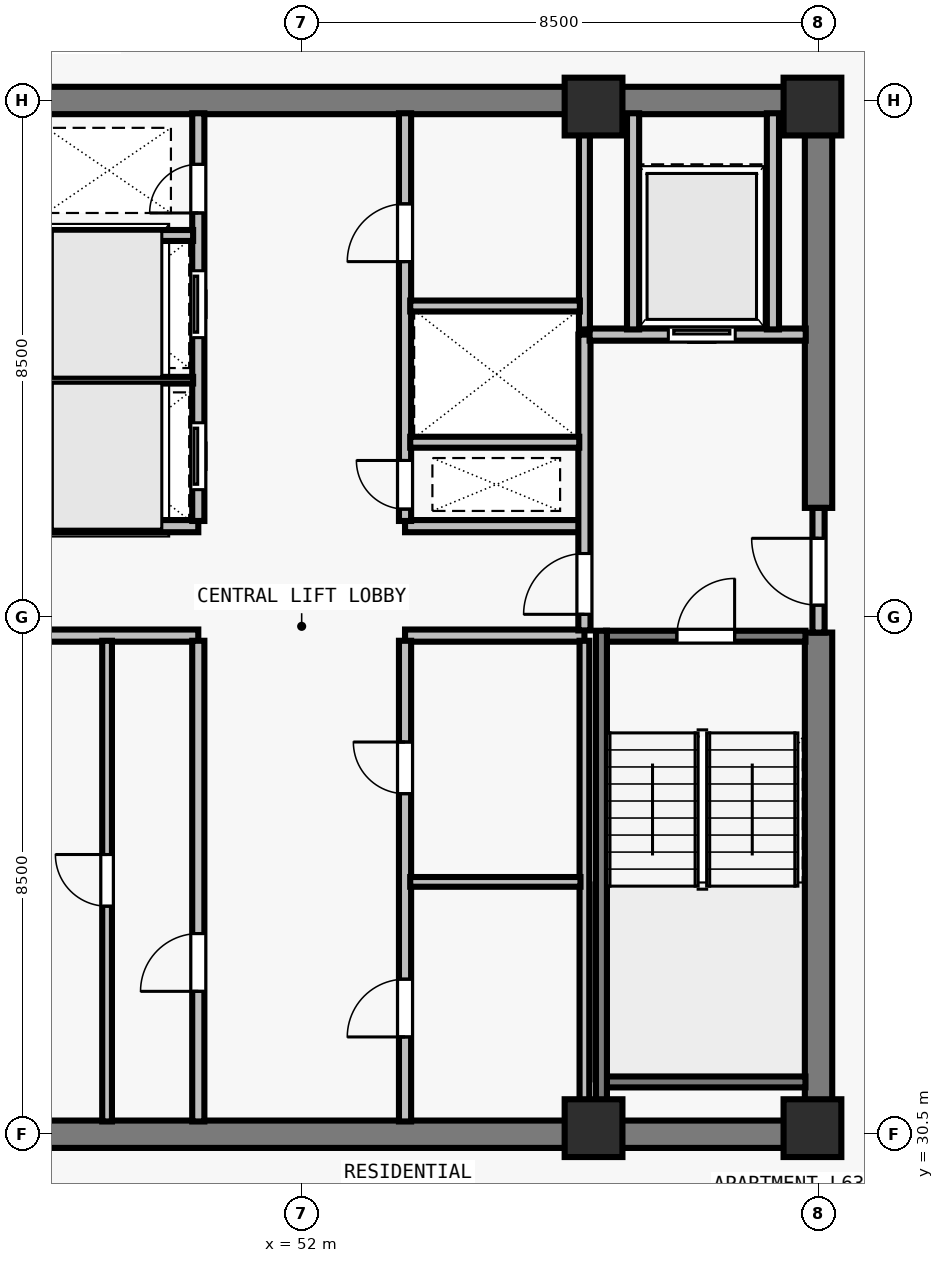
"""IFC4 building model, lengths in metres.
Left out: names, types, materials, properties, quantities, classifications, styles, units other than length and angle.
Written with IfcOpenShell. Run it as: python <this file> out.ifc"""

import sys

from ifc_helpers import new_model, si_unit, direction, frame, frame_2d, origin, origin_2d, place, context, subcontext, project, spatial, rectangle, extrude, element, fill, save


model = new_model("IFC4")
c1 = context("Model", 3, precision=1e-05, world=origin(), true_north=direction((0.0, 1.0)))
c2 = subcontext(c1, "Body", "Model", "MODEL_VIEW")
j1 = project(units=[si_unit("LENGTHUNIT", "METRE"), si_unit("PLANEANGLEUNIT", "RADIAN")], contexts=[c1])
p1 = place(None, origin())
s1 = spatial("IfcSite", under=j1, at=p1, CompositionType="ELEMENT")
p2 = place(p1, origin())
s2 = spatial("IfcBuilding", under=s1, at=p2, CompositionType="ELEMENT")
p3 = place(p2, frame((0.0, 0.0, 230.5)))
s3 = spatial("IfcBuildingStorey", under=s2, at=p3, CompositionType="ELEMENT", Elevation=230.5)
for number, where, z_axis, x_axis in (
    (1, (56.8, 30.6, 0.0), (0.0, 0.0, 1.0), (1.0, 0.0, 0.0)),
    (2, (60.4, 30.6, 0.0), (0.0, 0.0, 1.0), (1.0, 0.0, 0.0)),
    (3, (56.8, 47.4, 0.0), (0.0, 0.0, 1.0), (1.0, 0.0, 0.0)),
    (4, (60.4, 47.4, 0.0), (0.0, 0.0, 1.0), (1.0, 0.0, 0.0)),
):
    element("IfcColumn", number, at=place(p3, frame(where, z_axis=z_axis, x_axis=x_axis)), inside=s3, PredefinedType="COLUMN", context=c2, shape_type="SweptSolid", body=[
        extrude(rectangle(XDim=0.95, YDim=0.95, at=origin_2d()), origin(), (0.0, 0.0, 1.0), 3.5),
    ])
for number, where, z_axis, x_axis in (
    (5, (43.275, 30.5, 0.0), (0.0, 0.0, 1.0), (1.0, 0.0, 0.0)),
    (6, (43.275, 47.5, 0.0), (0.0, 0.0, 1.0), (1.0, 0.0, 0.0)),
):
    element("IfcWall", number, at=place(p3, frame(where, z_axis=z_axis, x_axis=x_axis)), inside=s3, PredefinedType="SHEAR", context=c2, shape_type="SweptSolid", body=[
        extrude(rectangle(XDim=17.45, YDim=0.45, at=frame_2d((8.725, 0.0))), origin(), (0.0, 0.0, 1.0), 3.29),
    ])
p4 = place(p3, frame((60.5, 30.715, 0.0), z_axis=(0.0, 0.0, 1.0), x_axis=(0.0, 1.0, 0.0)))
e7 = element("IfcWall", 7, at=p4, inside=s3, PredefinedType="SHEAR", context=c2, shape_type="SweptSolid", body=[
    extrude(rectangle(XDim=8.035, YDim=0.45, at=frame_2d((4.018, 0.0))), origin(), (0.0, 0.0, 1.0), 3.29),
])
p5 = place(p3, frame((60.5, 40.8, 0.0), z_axis=(0.0, 0.0, 1.0), x_axis=(0.0, 1.0, 0.0)))
e8 = element("IfcWall", 8, at=p5, inside=s3, PredefinedType="SHEAR", context=c2, shape_type="SweptSolid", body=[
    extrude(rectangle(XDim=6.485, YDim=0.45, at=frame_2d((3.242, 0.0))), origin(), (0.0, 0.0, 1.0), 3.29),
])
for number, where, z_axis, x_axis in (
    (9, (47.35, 38.7, 0.0), (0.0, 0.0, 1.0), (1.0, 0.0, 0.0)),
    (10, (47.35, 40.5, 0.0), (0.0, 0.0, 1.0), (1.0, 0.0, 0.0)),
    (11, (53.7, 38.7, 0.0), (0.0, 0.0, 1.0), (1.0, 0.0, 0.0)),
    (12, (53.7, 40.5, 0.0), (0.0, 0.0, 1.0), (1.0, 0.0, 0.0)),
):
    element("IfcWall", number, at=place(p3, frame(where, z_axis=z_axis, x_axis=x_axis)), inside=s3, PredefinedType="SOLIDWALL", context=c2, shape_type="SweptSolid", body=[
        extrude(rectangle(XDim=2.95, YDim=0.2, at=frame_2d((1.475, 0.0))), origin(), (0.0, 0.0, 1.0), 3.29),
    ])
p6 = place(p3, frame((50.3, 30.71, 0.0), z_axis=(0.0, 0.0, 1.0), x_axis=(0.0, 1.0, 0.0)))
e13 = element("IfcWall", 13, at=p6, inside=s3, PredefinedType="SOLIDWALL", context=c2, shape_type="SweptSolid", body=[
    extrude(rectangle(XDim=7.905, YDim=0.2, at=frame_2d((3.953, 0.0))), origin(), (0.0, 0.0, 1.0), 3.29),
])
p7 = place(p6, frame((2.14, 0.0, 0.0)))
e14 = element("IfcOpeningElement", 14, at=p7, cuts=e13, PredefinedType="OPENING", context=c2, shape_type="SweptSolid", body=[
    extrude(rectangle(XDim=0.95, YDim=2.12, at=frame_2d((0.475, 1.06))), frame((0.0, 0.11, 0.0), z_axis=(0.0, -1.0, 0.0), x_axis=(1.0, 0.0, 0.0)), (0.0, 0.0, 1.0), 0.22),
])
p8 = place(p3, frame((53.7, 30.71, 0.0), z_axis=(0.0, 0.0, 1.0), x_axis=(0.0, 1.0, 0.0)))
e15 = element("IfcWall", 15, at=p8, inside=s3, PredefinedType="SOLIDWALL", context=c2, shape_type="SweptSolid", body=[
    extrude(rectangle(XDim=7.905, YDim=0.2, at=frame_2d((3.953, 0.0))), origin(), (0.0, 0.0, 1.0), 3.29),
])
p9 = place(p8, frame((1.39, 0.0, 0.0)))
e16 = element("IfcOpeningElement", 16, at=p9, cuts=e15, PredefinedType="OPENING", context=c2, shape_type="SweptSolid", body=[
    extrude(rectangle(XDim=0.95, YDim=2.12, at=frame_2d((0.475, 1.06))), frame((0.0, 0.11, 0.0), z_axis=(0.0, -1.0, 0.0), x_axis=(1.0, 0.0, 0.0)), (0.0, 0.0, 1.0), 0.22),
])
p10 = place(p8, frame((5.39, 0.0, 0.0)))
e17 = element("IfcOpeningElement", 17, at=p10, cuts=e15, PredefinedType="OPENING", context=c2, shape_type="SweptSolid", body=[
    extrude(rectangle(XDim=0.85, YDim=2.12, at=frame_2d((0.425, 1.06))), frame((0.0, 0.11, 0.0), z_axis=(0.0, -1.0, 0.0), x_axis=(1.0, 0.0, 0.0)), (0.0, 0.0, 1.0), 0.22),
])
p11 = place(p3, frame((50.3, 40.585, 0.0), z_axis=(0.0, 0.0, 1.0), x_axis=(0.0, 1.0, 0.0)))
e18 = element("IfcWall", 18, at=p11, inside=s3, PredefinedType="SOLIDWALL", context=c2, shape_type="SweptSolid", body=[
    extrude(rectangle(XDim=6.705, YDim=0.2, at=frame_2d((3.353, 0.0))), origin(), (0.0, 0.0, 1.0), 3.29),
])
p12 = place(p11, frame((0.515, 0.0, 0.0)))
e19 = element("IfcOpeningElement", 19, at=p12, cuts=e18, PredefinedType="OPENING", context=c2, shape_type="SweptSolid", body=[
    extrude(rectangle(XDim=1.1, YDim=2.2, at=frame_2d((0.55, 1.1))), frame((0.0, 0.11, 0.0), z_axis=(0.0, -1.0, 0.0), x_axis=(1.0, 0.0, 0.0)), (0.0, 0.0, 1.0), 0.22),
])
p13 = place(p11, frame((3.015, 0.0, 0.0)))
e20 = element("IfcOpeningElement", 20, at=p13, cuts=e18, PredefinedType="OPENING", context=c2, shape_type="SweptSolid", body=[
    extrude(rectangle(XDim=1.1, YDim=2.2, at=frame_2d((0.55, 1.1))), frame((0.0, 0.11, 0.0), z_axis=(0.0, -1.0, 0.0), x_axis=(1.0, 0.0, 0.0)), (0.0, 0.0, 1.0), 0.22),
])
p14 = place(p11, frame((5.065, 0.0, 0.0)))
e21 = element("IfcOpeningElement", 21, at=p14, cuts=e18, PredefinedType="OPENING", context=c2, shape_type="SweptSolid", body=[
    extrude(rectangle(XDim=0.8, YDim=2.08, at=frame_2d((0.4, 1.04))), frame((0.0, 0.11, 0.0), z_axis=(0.0, -1.0, 0.0), x_axis=(1.0, 0.0, 0.0)), (0.0, 0.0, 1.0), 0.22),
])
p15 = place(p3, frame((53.7, 40.585, 0.0), z_axis=(0.0, 0.0, 1.0), x_axis=(0.0, 1.0, 0.0)))
e22 = element("IfcWall", 22, at=p15, inside=s3, PredefinedType="SOLIDWALL", context=c2, shape_type="SweptSolid", body=[
    extrude(rectangle(XDim=6.705, YDim=0.2, at=frame_2d((3.353, 0.0))), origin(), (0.0, 0.0, 1.0), 3.29),
])
p16 = place(p15, frame((0.195, 0.0, 0.0)))
e23 = element("IfcOpeningElement", 23, at=p16, cuts=e22, PredefinedType="OPENING", context=c2, shape_type="SweptSolid", body=[
    extrude(rectangle(XDim=0.8, YDim=2.08, at=frame_2d((0.4, 1.04))), frame((0.0, 0.11, 0.0), z_axis=(0.0, -1.0, 0.0), x_axis=(1.0, 0.0, 0.0)), (0.0, 0.0, 1.0), 0.22),
])
p17 = place(p15, frame((4.265, 0.0, 0.0)))
e24 = element("IfcOpeningElement", 24, at=p17, cuts=e22, PredefinedType="OPENING", context=c2, shape_type="SweptSolid", body=[
    extrude(rectangle(XDim=0.95, YDim=2.12, at=frame_2d((0.475, 1.06))), frame((0.0, 0.11, 0.0), z_axis=(0.0, -1.0, 0.0), x_axis=(1.0, 0.0, 0.0)), (0.0, 0.0, 1.0), 0.22),
])
p18 = place(p3, frame((60.5, 38.75, 0.0), z_axis=(0.0, 0.0, 1.0), x_axis=(0.0, 1.0, 0.0)))
e25 = element("IfcWall", 25, at=p18, inside=s3, PredefinedType="SOLIDWALL", context=c2, shape_type="SweptSolid", body=[
    extrude(rectangle(XDim=2.05, YDim=0.2, at=frame_2d((1.025, 0.0))), origin(), (0.0, 0.0, 1.0), 3.29),
])
p19 = place(p18, frame((0.45, 0.0, 0.0)))
e26 = element("IfcOpeningElement", 26, at=p19, cuts=e25, PredefinedType="OPENING", context=c2, shape_type="SweptSolid", body=[
    extrude(rectangle(XDim=1.1, YDim=2.15, at=frame_2d((0.55, 1.075))), frame((0.0, 0.11, 0.0), z_axis=(0.0, -1.0, 0.0), x_axis=(1.0, 0.0, 0.0)), (0.0, 0.0, 1.0), 0.22),
])
p20 = place(p3, frame((56.65, 38.785, 0.0), z_axis=(0.0, 0.0, 1.0), x_axis=(0.0, 1.0, 0.0)))
e27 = element("IfcWall", 27, at=p20, inside=s3, PredefinedType="SOLIDWALL", context=c2, shape_type="SweptSolid", body=[
    extrude(rectangle(XDim=4.865, YDim=0.2, at=frame_2d((2.433, 0.0))), origin(), (0.0, 0.0, 1.0), 3.29),
])
p21 = place(p20, frame((0.265, 0.0, 0.0)))
e28 = element("IfcOpeningElement", 28, at=p21, cuts=e27, PredefinedType="OPENING", context=c2, shape_type="SweptSolid", body=[
    extrude(rectangle(XDim=1.0, YDim=2.15, at=frame_2d((0.5, 1.075))), frame((0.0, 0.11, 0.0), z_axis=(0.0, -1.0, 0.0), x_axis=(1.0, 0.0, 0.0)), (0.0, 0.0, 1.0), 0.22),
])
p22 = place(p3, frame((56.735, 43.65, 0.0), z_axis=(0.0, 0.0, 1.0), x_axis=(1.0, 0.0, 0.0)))
e29 = element("IfcWall", 29, at=p22, inside=s3, PredefinedType="SOLIDWALL", context=c2, shape_type="SweptSolid", body=[
    extrude(rectangle(XDim=3.555, YDim=0.2, at=frame_2d((1.777, 0.0))), origin(), (0.0, 0.0, 1.0), 3.29),
])
p23 = place(p22, frame((1.295, 0.0, 0.0)))
e30 = element("IfcOpeningElement", 30, at=p23, cuts=e29, PredefinedType="OPENING", context=c2, shape_type="SweptSolid", body=[
    extrude(rectangle(XDim=1.1, YDim=2.2, at=frame_2d((0.55, 1.1))), frame((0.0, 0.11, 0.0), z_axis=(0.0, -1.0, 0.0), x_axis=(1.0, 0.0, 0.0)), (0.0, 0.0, 1.0), 0.22),
])
for number, where, z_axis, x_axis in (
    (31, (57.45, 43.735, 0.0), (0.0, 0.0, 1.0), (0.0, 1.0, 0.0)),
    (32, (59.75, 43.735, 0.0), (0.0, 0.0, 1.0), (0.0, 1.0, 0.0)),
):
    element("IfcWall", number, at=place(p3, frame(where, z_axis=z_axis, x_axis=x_axis)), inside=s3, PredefinedType="SOLIDWALL", context=c2, shape_type="SweptSolid", body=[
        extrude(rectangle(XDim=3.555, YDim=0.2, at=frame_2d((1.777, 0.0))), origin(), (0.0, 0.0, 1.0), 3.29),
    ])
p24 = place(p3, frame((48.8, 30.71, 0.0), z_axis=(0.0, 0.0, 1.0), x_axis=(0.0, 1.0, 0.0)))
e33 = element("IfcWall", 33, at=p24, inside=s3, PredefinedType="PARTITIONING", context=c2, shape_type="SweptSolid", body=[
    extrude(rectangle(XDim=7.905, YDim=0.16, at=frame_2d((3.953, 0.0))), origin(), (0.0, 0.0, 1.0), 3.29),
])
p25 = place(p24, frame((3.54, 0.0, 0.0)))
e34 = element("IfcOpeningElement", 34, at=p25, cuts=e33, PredefinedType="OPENING", context=c2, shape_type="SweptSolid", body=[
    extrude(rectangle(XDim=0.85, YDim=2.12, at=frame_2d((0.425, 1.06))), frame((0.0, 0.09, 0.0), z_axis=(0.0, -1.0, 0.0), x_axis=(1.0, 0.0, 0.0)), (0.0, 0.0, 1.0), 0.18),
])
p26 = place(p3, frame((56.65, 30.71, 0.0), z_axis=(0.0, 0.0, 1.0), x_axis=(0.0, 1.0, 0.0)))
e35 = element("IfcWall", 35, at=p26, inside=s3, PredefinedType="PARTITIONING", context=c2, shape_type="SweptSolid", body=[
    extrude(rectangle(XDim=7.905, YDim=0.16, at=frame_2d((3.953, 0.0))), origin(), (0.0, 0.0, 1.0), 3.29),
])
p27 = place(p3, frame((53.785, 34.65, 0.0), z_axis=(0.0, 0.0, 1.0), x_axis=(1.0, 0.0, 0.0)))
e36 = element("IfcWall", 36, at=p27, inside=s3, PredefinedType="PARTITIONING", context=c2, shape_type="SweptSolid", body=[
    extrude(rectangle(XDim=2.8, YDim=0.16, at=frame_2d((1.4, 0.0))), origin(), (0.0, 0.0, 1.0), 3.29),
])
p28 = place(p3, frame((47.435, 42.9, 0.0), z_axis=(0.0, 0.0, 1.0), x_axis=(1.0, 0.0, 0.0)))
e37 = element("IfcWall", 37, at=p28, inside=s3, PredefinedType="PARTITIONING", context=c2, shape_type="SweptSolid", body=[
    extrude(rectangle(XDim=2.78, YDim=0.11, at=frame_2d((1.39, 0.0))), origin(), (0.0, 0.0, 1.0), 3.29),
])
p29 = place(p3, frame((47.425, 45.28, 0.0), z_axis=(0.0, 0.0, 1.0), x_axis=(1.0, 0.0, 0.0)))
e38 = element("IfcWall", 38, at=p29, inside=s3, PredefinedType="SOLIDWALL", context=c2, shape_type="SweptSolid", body=[
    extrude(rectangle(XDim=2.79, YDim=0.18, at=frame_2d((1.395, 0.0))), origin(), (0.0, 0.0, 1.0), 3.29),
])
p30 = place(p3, frame((56.65, 43.735, 0.0), z_axis=(0.0, 0.0, 1.0), x_axis=(0.0, 1.0, 0.0)))
e39 = element("IfcWall", 39, at=p30, inside=s3, PredefinedType="SOLIDWALL", context=c2, shape_type="SweptSolid", body=[
    extrude(rectangle(XDim=3.555, YDim=0.18, at=frame_2d((1.777, 0.0))), origin(), (0.0, 0.0, 1.0), 3.29),
])
p31 = place(p3, frame((53.785, 41.88, 0.0), z_axis=(0.0, 0.0, 1.0), x_axis=(1.0, 0.0, 0.0)))
e40 = element("IfcWall", 40, at=p31, inside=s3, PredefinedType="SOLIDWALL", context=c2, shape_type="SweptSolid", body=[
    extrude(rectangle(XDim=2.78, YDim=0.18, at=frame_2d((1.39, 0.0))), origin(), (0.0, 0.0, 1.0), 3.29),
])
p32 = place(p3, frame((53.785, 44.12, 0.0), z_axis=(0.0, 0.0, 1.0), x_axis=(1.0, 0.0, 0.0)))
e41 = element("IfcWall", 41, at=p32, inside=s3, PredefinedType="SOLIDWALL", context=c2, shape_type="SweptSolid", body=[
    extrude(rectangle(XDim=2.79, YDim=0.18, at=frame_2d((1.395, 0.0))), origin(), (0.0, 0.0, 1.0), 3.29),
])
p33 = place(p3, frame((57.005, 38.69, 0.0), z_axis=(0.0, 0.0, 1.0), x_axis=(1.0, 0.0, 0.0)))
e42 = element("IfcWall", 42, at=p33, inside=s3, PredefinedType="SOLIDWALL", context=c2, shape_type="SweptSolid", body=[
    extrude(rectangle(XDim=3.28, YDim=0.18, at=frame_2d((1.64, 0.0))), origin(), (0.0, 0.0, 1.0), 3.29),
])
p34 = place(p33, frame((1.165, 0.0, 0.0)))
e43 = element("IfcOpeningElement", 43, at=p34, cuts=e42, PredefinedType="OPENING", context=c2, shape_type="SweptSolid", body=[
    extrude(rectangle(XDim=0.95, YDim=2.15, at=frame_2d((0.475, 1.075))), frame((0.0, 0.1, 0.0), z_axis=(0.0, -1.0, 0.0), x_axis=(1.0, 0.0, 0.0)), (0.0, 0.0, 1.0), 0.2),
])
p35 = place(p3, frame((57.005, 31.36, 0.0), z_axis=(0.0, 0.0, 1.0), x_axis=(1.0, 0.0, 0.0)))
e44 = element("IfcWall", 44, at=p35, inside=s3, PredefinedType="SOLIDWALL", context=c2, shape_type="SweptSolid", body=[
    extrude(rectangle(XDim=3.28, YDim=0.18, at=frame_2d((1.64, 0.0))), origin(), (0.0, 0.0, 1.0), 3.29),
])
p36 = place(p3, frame((56.93, 38.78, 0.0), z_axis=(0.0, 0.0, 1.0), x_axis=(0.0, -1.0, 0.0)))
e45 = element("IfcWall", 45, at=p36, inside=s3, PredefinedType="SOLIDWALL", context=c2, shape_type="SweptSolid", body=[
    extrude(rectangle(XDim=8.067, YDim=0.18, at=frame_2d((4.034, 0.0))), origin(), (0.0, 0.0, 1.0), 3.29),
])
p37 = place(p19, origin())
e46 = element("IfcDoor", 46, at=p37, inside=s3, OperationType="SINGLE_SWING_RIGHT", PredefinedType="DOOR", context=c2, shape_type="SweptSolid", body=[
    extrude(rectangle(XDim=1.1, YDim=2.15, at=frame_2d((0.55, 1.075))), frame((0.0, 0.025, 0.0), z_axis=(0.0, -1.0, 0.0), x_axis=(1.0, 0.0, 0.0)), (0.0, 0.0, 1.0), 0.05),
])
fill(e26, e46)
p38 = place(p21, origin())
e47 = element("IfcDoor", 47, at=p38, inside=s3, OperationType="SINGLE_SWING_LEFT", PredefinedType="DOOR", context=c2, shape_type="SweptSolid", body=[
    extrude(rectangle(XDim=1.0, YDim=2.15, at=frame_2d((0.5, 1.075))), frame((0.0, 0.025, 0.0), z_axis=(0.0, -1.0, 0.0), x_axis=(1.0, 0.0, 0.0)), (0.0, 0.0, 1.0), 0.05),
])
fill(e28, e47)
p39 = place(p23, origin())
e48 = element("IfcDoor", 48, at=p39, inside=s3, OperationType="SLIDING_TO_LEFT", PredefinedType="DOOR", context=c2, shape_type="SweptSolid", body=[
    extrude(rectangle(XDim=1.1, YDim=2.2, at=frame_2d((0.55, 1.1))), frame((0.0, 0.025, 0.0), z_axis=(0.0, -1.0, 0.0), x_axis=(1.0, 0.0, 0.0)), (0.0, 0.0, 1.0), 0.05),
])
fill(e30, e48)
p40 = place(p7, origin())
e49 = element("IfcDoor", 49, at=p40, inside=s3, OperationType="SINGLE_SWING_LEFT", PredefinedType="DOOR", context=c2, shape_type="SweptSolid", body=[
    extrude(rectangle(XDim=0.95, YDim=2.12, at=frame_2d((0.475, 1.06))), frame((0.0, 0.025, 0.0), z_axis=(0.0, -1.0, 0.0), x_axis=(1.0, 0.0, 0.0)), (0.0, 0.0, 1.0), 0.05),
])
fill(e14, e49)
p41 = place(p25, origin())
e50 = element("IfcDoor", 50, at=p41, inside=s3, OperationType="SINGLE_SWING_RIGHT", PredefinedType="DOOR", context=c2, shape_type="SweptSolid", body=[
    extrude(rectangle(XDim=0.85, YDim=2.12, at=frame_2d((0.425, 1.06))), frame((0.0, 0.025, 0.0), z_axis=(0.0, -1.0, 0.0), x_axis=(1.0, 0.0, 0.0)), (0.0, 0.0, 1.0), 0.05),
])
fill(e34, e50)
p42 = place(p9, origin())
e51 = element("IfcDoor", 51, at=p42, inside=s3, OperationType="SINGLE_SWING_LEFT", PredefinedType="DOOR", context=c2, shape_type="SweptSolid", body=[
    extrude(rectangle(XDim=0.95, YDim=2.12, at=frame_2d((0.475, 1.06))), frame((0.0, 0.025, 0.0), z_axis=(0.0, -1.0, 0.0), x_axis=(1.0, 0.0, 0.0)), (0.0, 0.0, 1.0), 0.05),
])
fill(e16, e51)
p43 = place(p10, origin())
e52 = element("IfcDoor", 52, at=p43, inside=s3, OperationType="SINGLE_SWING_RIGHT", PredefinedType="DOOR", context=c2, shape_type="SweptSolid", body=[
    extrude(rectangle(XDim=0.85, YDim=2.12, at=frame_2d((0.425, 1.06))), frame((0.0, 0.025, 0.0), z_axis=(0.0, -1.0, 0.0), x_axis=(1.0, 0.0, 0.0)), (0.0, 0.0, 1.0), 0.05),
])
fill(e17, e52)
p44 = place(p12, origin())
e53 = element("IfcDoor", 53, at=p44, inside=s3, OperationType="SLIDING_TO_LEFT", PredefinedType="DOOR", context=c2, shape_type="SweptSolid", body=[
    extrude(rectangle(XDim=1.1, YDim=2.2, at=frame_2d((0.55, 1.1))), frame((0.0, 0.025, 0.0), z_axis=(0.0, -1.0, 0.0), x_axis=(1.0, 0.0, 0.0)), (0.0, 0.0, 1.0), 0.05),
])
fill(e19, e53)
p45 = place(p13, origin())
e54 = element("IfcDoor", 54, at=p45, inside=s3, OperationType="SLIDING_TO_LEFT", PredefinedType="DOOR", context=c2, shape_type="SweptSolid", body=[
    extrude(rectangle(XDim=1.1, YDim=2.2, at=frame_2d((0.55, 1.1))), frame((0.0, 0.025, 0.0), z_axis=(0.0, -1.0, 0.0), x_axis=(1.0, 0.0, 0.0)), (0.0, 0.0, 1.0), 0.05),
])
fill(e20, e54)
p46 = place(p14, origin())
e55 = element("IfcDoor", 55, at=p46, inside=s3, OperationType="SINGLE_SWING_LEFT", PredefinedType="DOOR", context=c2, shape_type="SweptSolid", body=[
    extrude(rectangle(XDim=0.8, YDim=2.08, at=frame_2d((0.4, 1.04))), frame((0.0, 0.025, 0.0), z_axis=(0.0, -1.0, 0.0), x_axis=(1.0, 0.0, 0.0)), (0.0, 0.0, 1.0), 0.05),
])
fill(e21, e55)
p47 = place(p16, origin())
e56 = element("IfcDoor", 56, at=p47, inside=s3, OperationType="SINGLE_SWING_RIGHT", PredefinedType="DOOR", context=c2, shape_type="SweptSolid", body=[
    extrude(rectangle(XDim=0.8, YDim=2.08, at=frame_2d((0.4, 1.04))), frame((0.0, 0.025, 0.0), z_axis=(0.0, -1.0, 0.0), x_axis=(1.0, 0.0, 0.0)), (0.0, 0.0, 1.0), 0.05),
])
fill(e23, e56)
p48 = place(p17, origin())
e57 = element("IfcDoor", 57, at=p48, inside=s3, OperationType="SINGLE_SWING_LEFT", PredefinedType="DOOR", context=c2, shape_type="SweptSolid", body=[
    extrude(rectangle(XDim=0.95, YDim=2.12, at=frame_2d((0.475, 1.06))), frame((0.0, 0.025, 0.0), z_axis=(0.0, -1.0, 0.0), x_axis=(1.0, 0.0, 0.0)), (0.0, 0.0, 1.0), 0.05),
])
fill(e24, e57)
p49 = place(p34, origin())
e58 = element("IfcDoor", 58, at=p49, inside=s3, OperationType="SINGLE_SWING_RIGHT", PredefinedType="DOOR", context=c2, shape_type="SweptSolid", body=[
    extrude(rectangle(XDim=0.95, YDim=2.15, at=frame_2d((0.475, 1.075))), frame((0.0, 0.025, 0.0), z_axis=(0.0, -1.0, 0.0), x_axis=(1.0, 0.0, 0.0)), (0.0, 0.0, 1.0), 0.05),
])
fill(e43, e58)
save(model, sys.argv[1])
